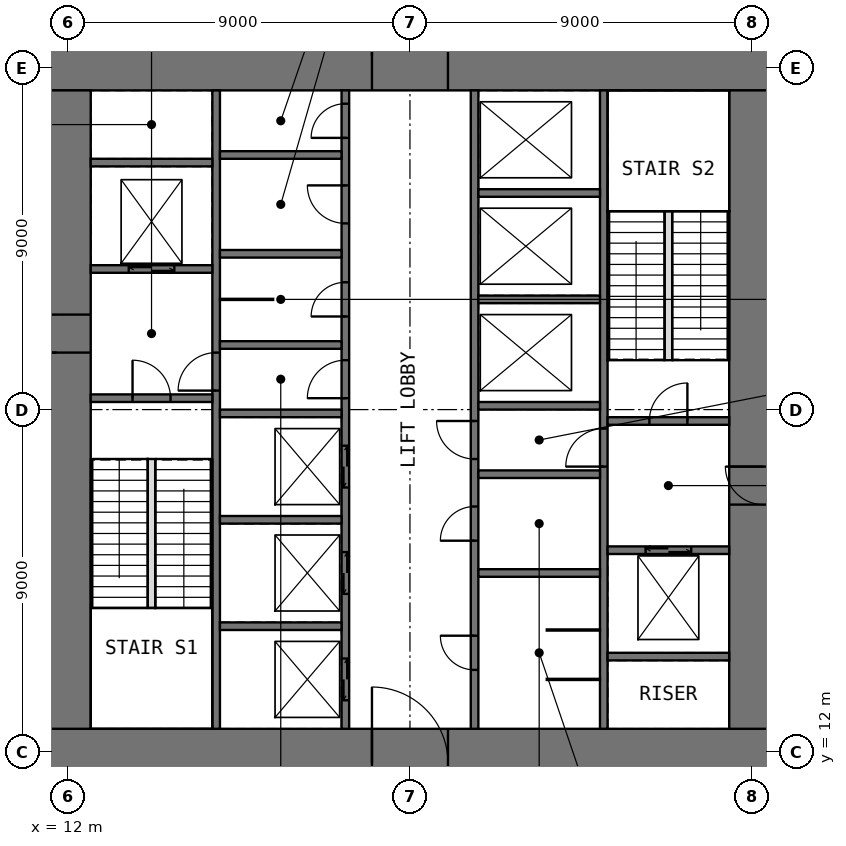
"""IFC4 building model, lengths in metres.
Left out: names, types, materials, properties, quantities, classifications, styles, units other than length and angle.
Written with IfcOpenShell. Run it as: python <this file> out.ifc"""

import sys

from ifc_helpers import new_model, si_unit, direction, frame, frame_2d, origin, place, context, subcontext, project, spatial, rectangle, extrude, element, fill, save


model = new_model("IFC4")
c1 = context("Model", 3, precision=1e-05, world=origin(), true_north=direction((0.0, 1.0)))
c2 = subcontext(c1, "Body", "Model", "MODEL_VIEW")
j1 = project(units=[si_unit("LENGTHUNIT", "METRE"), si_unit("PLANEANGLEUNIT", "RADIAN")], contexts=[c1])
p1 = place(None, origin())
s1 = spatial("IfcSite", under=j1, at=p1, CompositionType="ELEMENT")
p2 = place(p1, origin())
s2 = spatial("IfcBuilding", under=s1, at=p2, CompositionType="ELEMENT")
p3 = place(p2, frame((0.0, 0.0, 6.0)))
s3 = spatial("IfcBuildingStorey", under=s2, at=p3, CompositionType="ELEMENT", Elevation=6.0)
p4 = place(p3, frame((10.8, 11.7, -0.2), z_axis=(0.0, 0.0, 1.0), x_axis=(1.0, 0.0, 0.0)))
e1 = element("IfcWall", 1, at=p4, inside=s3, PredefinedType="SHEAR", context=c2, shape_type="SweptSolid", body=[
    extrude(rectangle(XDim=20.4, YDim=1.8, at=frame_2d((10.2, 0.0))), origin(), (0.0, 0.0, 1.0), 4.9),
])
p5 = place(p4, frame((9.2, 0.0, 0.2)))
e2 = element("IfcOpeningElement", 2, at=p5, cuts=e1, PredefinedType="OPENING", context=c2, shape_type="SweptSolid", body=[
    extrude(rectangle(XDim=2.0, YDim=2.2, at=frame_2d((1.0, 1.1))), frame((0.0, 0.91, 0.0), z_axis=(0.0, -1.0, 0.0), x_axis=(1.0, 0.0, 0.0)), (0.0, 0.0, 1.0), 1.82),
])
p6 = place(p3, frame((10.8, 30.3, -0.2), z_axis=(0.0, 0.0, 1.0), x_axis=(1.0, 0.0, 0.0)))
e3 = element("IfcWall", 3, at=p6, inside=s3, PredefinedType="SHEAR", context=c2, shape_type="SweptSolid", body=[
    extrude(rectangle(XDim=20.4, YDim=1.8, at=frame_2d((10.2, 0.0))), origin(), (0.0, 0.0, 1.0), 4.9),
])
p7 = place(p6, frame((9.2, 0.0, 0.2)))
e4 = element("IfcOpeningElement", 4, at=p7, cuts=e3, PredefinedType="OPENING", context=c2, shape_type="SweptSolid", body=[
    extrude(rectangle(XDim=2.0, YDim=2.2, at=frame_2d((1.0, 1.1))), frame((0.0, 0.91, 0.0), z_axis=(0.0, -1.0, 0.0), x_axis=(1.0, 0.0, 0.0)), (0.0, 0.0, 1.0), 1.82),
])
p8 = place(p3, frame((11.7, 12.6, -0.2), z_axis=(0.0, 0.0, 1.0), x_axis=(0.0, 1.0, 0.0)))
e5 = element("IfcWall", 5, at=p8, inside=s3, PredefinedType="SHEAR", context=c2, shape_type="SweptSolid", body=[
    extrude(rectangle(XDim=16.8, YDim=1.8, at=frame_2d((8.4, 0.0))), origin(), (0.0, 0.0, 1.0), 4.9),
])
p9 = place(p8, frame((9.9, 0.0, 0.2)))
e6 = element("IfcOpeningElement", 6, at=p9, cuts=e5, PredefinedType="OPENING", context=c2, shape_type="SweptSolid", body=[
    extrude(rectangle(XDim=1.0, YDim=2.2, at=frame_2d((0.5, 1.1))), frame((0.0, 0.91, 0.0), z_axis=(0.0, -1.0, 0.0), x_axis=(1.0, 0.0, 0.0)), (0.0, 0.0, 1.0), 1.82),
])
p10 = place(p3, frame((30.3, 12.6, -0.2), z_axis=(0.0, 0.0, 1.0), x_axis=(0.0, 1.0, 0.0)))
e7 = element("IfcWall", 7, at=p10, inside=s3, PredefinedType="SHEAR", context=c2, shape_type="SweptSolid", body=[
    extrude(rectangle(XDim=16.8, YDim=1.8, at=frame_2d((8.4, 0.0))), origin(), (0.0, 0.0, 1.0), 4.9),
])
p11 = place(p10, frame((5.9, 0.0, 0.2)))
e8 = element("IfcOpeningElement", 8, at=p11, cuts=e7, PredefinedType="OPENING", context=c2, shape_type="SweptSolid", body=[
    extrude(rectangle(XDim=1.0, YDim=2.2, at=frame_2d((0.5, 1.1))), frame((0.0, 0.91, 0.0), z_axis=(0.0, -1.0, 0.0), x_axis=(1.0, 0.0, 0.0)), (0.0, 0.0, 1.0), 1.82),
])
p12 = place(p3, frame((15.9, 12.6, -0.2), z_axis=(0.0, 0.0, 1.0), x_axis=(0.0, 1.0, 0.0)))
e9 = element("IfcWall", 9, at=p12, inside=s3, PredefinedType="SHEAR", context=c2, shape_type="SweptSolid", body=[
    extrude(rectangle(XDim=16.8, YDim=0.2, at=frame_2d((8.4, 0.0))), origin(), (0.0, 0.0, 1.0), 4.9),
])
p13 = place(p12, frame((8.9, 0.0, 0.2)))
e10 = element("IfcOpeningElement", 10, at=p13, cuts=e9, PredefinedType="OPENING", context=c2, shape_type="SweptSolid", body=[
    extrude(rectangle(XDim=1.0, YDim=2.2, at=frame_2d((0.5, 1.1))), frame((0.0, 0.11, 0.0), z_axis=(0.0, -1.0, 0.0), x_axis=(1.0, 0.0, 0.0)), (0.0, 0.0, 1.0), 0.22),
])
p14 = place(p3, frame((19.3, 12.6, -0.2), z_axis=(0.0, 0.0, 1.0), x_axis=(0.0, 1.0, 0.0)))
e11 = element("IfcWall", 11, at=p14, inside=s3, PredefinedType="SHEAR", context=c2, shape_type="SweptSolid", body=[
    extrude(rectangle(XDim=16.8, YDim=0.2, at=frame_2d((8.4, 0.0))), origin(), (0.0, 0.0, 1.0), 4.9),
])
p15 = place(p14, frame((8.7, 0.0, 0.2)))
e12 = element("IfcOpeningElement", 12, at=p15, cuts=e11, PredefinedType="OPENING", context=c2, shape_type="SweptSolid", body=[
    extrude(rectangle(XDim=1.0, YDim=2.2, at=frame_2d((0.5, 1.1))), frame((0.0, 0.11, 0.0), z_axis=(0.0, -1.0, 0.0), x_axis=(1.0, 0.0, 0.0)), (0.0, 0.0, 1.0), 0.22),
])
p16 = place(p14, frame((10.85, 0.0, 0.2)))
e13 = element("IfcOpeningElement", 13, at=p16, cuts=e11, PredefinedType="OPENING", context=c2, shape_type="SweptSolid", body=[
    extrude(rectangle(XDim=0.9, YDim=2.2, at=frame_2d((0.45, 1.1))), frame((0.0, 0.11, 0.0), z_axis=(0.0, -1.0, 0.0), x_axis=(1.0, 0.0, 0.0)), (0.0, 0.0, 1.0), 0.22),
])
p17 = place(p14, frame((13.3, 0.0, 0.2)))
e14 = element("IfcOpeningElement", 14, at=p17, cuts=e11, PredefinedType="OPENING", context=c2, shape_type="SweptSolid", body=[
    extrude(rectangle(XDim=1.0, YDim=2.2, at=frame_2d((0.5, 1.1))), frame((0.0, 0.11, 0.0), z_axis=(0.0, -1.0, 0.0), x_axis=(1.0, 0.0, 0.0)), (0.0, 0.0, 1.0), 0.22),
])
p18 = place(p14, frame((15.55, 0.0, 0.2)))
e15 = element("IfcOpeningElement", 15, at=p18, cuts=e11, PredefinedType="OPENING", context=c2, shape_type="SweptSolid", body=[
    extrude(rectangle(XDim=0.9, YDim=2.2, at=frame_2d((0.45, 1.1))), frame((0.0, 0.11, 0.0), z_axis=(0.0, -1.0, 0.0), x_axis=(1.0, 0.0, 0.0)), (0.0, 0.0, 1.0), 0.22),
])
p19 = place(p14, frame((0.75, 0.0, 0.2)))
e16 = element("IfcOpeningElement", 16, at=p19, cuts=e11, PredefinedType="OPENING", context=c2, shape_type="SweptSolid", body=[
    extrude(rectangle(XDim=1.1, YDim=2.2, at=frame_2d((0.55, 1.1))), frame((0.0, 0.11, 0.0), z_axis=(0.0, -1.0, 0.0), x_axis=(1.0, 0.0, 0.0)), (0.0, 0.0, 1.0), 0.22),
])
p20 = place(p14, frame((3.55, 0.0, 0.2)))
e17 = element("IfcOpeningElement", 17, at=p20, cuts=e11, PredefinedType="OPENING", context=c2, shape_type="SweptSolid", body=[
    extrude(rectangle(XDim=1.1, YDim=2.2, at=frame_2d((0.55, 1.1))), frame((0.0, 0.11, 0.0), z_axis=(0.0, -1.0, 0.0), x_axis=(1.0, 0.0, 0.0)), (0.0, 0.0, 1.0), 0.22),
])
p21 = place(p14, frame((6.35, 0.0, 0.2)))
e18 = element("IfcOpeningElement", 18, at=p21, cuts=e11, PredefinedType="OPENING", context=c2, shape_type="SweptSolid", body=[
    extrude(rectangle(XDim=1.1, YDim=2.2, at=frame_2d((0.55, 1.1))), frame((0.0, 0.11, 0.0), z_axis=(0.0, -1.0, 0.0), x_axis=(1.0, 0.0, 0.0)), (0.0, 0.0, 1.0), 0.22),
])
p22 = place(p3, frame((22.7, 12.6, -0.2), z_axis=(0.0, 0.0, 1.0), x_axis=(0.0, 1.0, 0.0)))
e19 = element("IfcWall", 19, at=p22, inside=s3, PredefinedType="SHEAR", context=c2, shape_type="SweptSolid", body=[
    extrude(rectangle(XDim=16.8, YDim=0.2, at=frame_2d((8.4, 0.0))), origin(), (0.0, 0.0, 1.0), 4.9),
])
p23 = place(p22, frame((7.1, 0.0, 0.2)))
e20 = element("IfcOpeningElement", 20, at=p23, cuts=e19, PredefinedType="OPENING", context=c2, shape_type="SweptSolid", body=[
    extrude(rectangle(XDim=1.0, YDim=2.2, at=frame_2d((0.5, 1.1))), frame((0.0, 0.11, 0.0), z_axis=(0.0, -1.0, 0.0), x_axis=(1.0, 0.0, 0.0)), (0.0, 0.0, 1.0), 0.22),
])
p24 = place(p22, frame((1.55, 0.0, 0.2)))
e21 = element("IfcOpeningElement", 21, at=p24, cuts=e19, PredefinedType="OPENING", context=c2, shape_type="SweptSolid", body=[
    extrude(rectangle(XDim=0.9, YDim=2.2, at=frame_2d((0.45, 1.1))), frame((0.0, 0.11, 0.0), z_axis=(0.0, -1.0, 0.0), x_axis=(1.0, 0.0, 0.0)), (0.0, 0.0, 1.0), 0.22),
])
p25 = place(p22, frame((4.95, 0.0, 0.2)))
e22 = element("IfcOpeningElement", 22, at=p25, cuts=e19, PredefinedType="OPENING", context=c2, shape_type="SweptSolid", body=[
    extrude(rectangle(XDim=0.9, YDim=2.2, at=frame_2d((0.45, 1.1))), frame((0.0, 0.11, 0.0), z_axis=(0.0, -1.0, 0.0), x_axis=(1.0, 0.0, 0.0)), (0.0, 0.0, 1.0), 0.22),
])
p26 = place(p3, frame((26.1, 12.6, -0.2), z_axis=(0.0, 0.0, 1.0), x_axis=(0.0, 1.0, 0.0)))
e23 = element("IfcWall", 23, at=p26, inside=s3, PredefinedType="SHEAR", context=c2, shape_type="SweptSolid", body=[
    extrude(rectangle(XDim=16.8, YDim=0.2, at=frame_2d((8.4, 0.0))), origin(), (0.0, 0.0, 1.0), 4.9),
])
p27 = place(p26, frame((6.9, 0.0, 0.2)))
e24 = element("IfcOpeningElement", 24, at=p27, cuts=e23, PredefinedType="OPENING", context=c2, shape_type="SweptSolid", body=[
    extrude(rectangle(XDim=1.0, YDim=2.2, at=frame_2d((0.5, 1.1))), frame((0.0, 0.11, 0.0), z_axis=(0.0, -1.0, 0.0), x_axis=(1.0, 0.0, 0.0)), (0.0, 0.0, 1.0), 0.22),
])
p28 = place(p3, frame((12.6, 21.3, -0.2), z_axis=(0.0, 0.0, 1.0), x_axis=(1.0, 0.0, 0.0)))
e25 = element("IfcWall", 25, at=p28, inside=s3, PredefinedType="SHEAR", context=c2, shape_type="SweptSolid", body=[
    extrude(rectangle(XDim=3.2, YDim=0.2, at=frame_2d((1.6, 0.0))), origin(), (0.0, 0.0, 1.0), 4.9),
])
p29 = place(p28, frame((1.1, 0.0, 0.2)))
e26 = element("IfcOpeningElement", 26, at=p29, cuts=e25, PredefinedType="OPENING", context=c2, shape_type="SweptSolid", body=[
    extrude(rectangle(XDim=1.0, YDim=2.2, at=frame_2d((0.5, 1.1))), frame((0.0, 0.11, 0.0), z_axis=(0.0, -1.0, 0.0), x_axis=(1.0, 0.0, 0.0)), (0.0, 0.0, 1.0), 0.22),
])
p30 = place(p3, frame((12.6, 24.7, -0.2), z_axis=(0.0, 0.0, 1.0), x_axis=(1.0, 0.0, 0.0)))
e27 = element("IfcWall", 27, at=p30, inside=s3, PredefinedType="SHEAR", context=c2, shape_type="SweptSolid", body=[
    extrude(rectangle(XDim=3.2, YDim=0.2, at=frame_2d((1.6, 0.0))), origin(), (0.0, 0.0, 1.0), 4.9),
])
p31 = place(p30, frame((1.0, 0.0, 0.2)))
e28 = element("IfcOpeningElement", 28, at=p31, cuts=e27, PredefinedType="OPENING", context=c2, shape_type="SweptSolid", body=[
    extrude(rectangle(XDim=1.2, YDim=2.2, at=frame_2d((0.6, 1.1))), frame((0.0, 0.11, 0.0), z_axis=(0.0, -1.0, 0.0), x_axis=(1.0, 0.0, 0.0)), (0.0, 0.0, 1.0), 0.22),
])
for number, where, z_axis, x_axis in (
    (29, (12.6, 27.5, -0.2), (0.0, 0.0, 1.0), (1.0, 0.0, 0.0)),
    (30, (16.0, 15.3, -0.2), (0.0, 0.0, 1.0), (1.0, 0.0, 0.0)),
    (31, (16.0, 18.1, -0.2), (0.0, 0.0, 1.0), (1.0, 0.0, 0.0)),
    (32, (16.0, 20.9, -0.2), (0.0, 0.0, 1.0), (1.0, 0.0, 0.0)),
    (33, (16.0, 22.7, -0.2), (0.0, 0.0, 1.0), (1.0, 0.0, 0.0)),
    (34, (16.0, 25.1, -0.2), (0.0, 0.0, 1.0), (1.0, 0.0, 0.0)),
    (35, (16.0, 27.7, -0.2), (0.0, 0.0, 1.0), (1.0, 0.0, 0.0)),
    (36, (22.8, 16.7, -0.2), (0.0, 0.0, 1.0), (1.0, 0.0, 0.0)),
    (37, (22.8, 19.3, -0.2), (0.0, 0.0, 1.0), (1.0, 0.0, 0.0)),
    (38, (22.8, 21.1, -0.2), (0.0, 0.0, 1.0), (1.0, 0.0, 0.0)),
    (39, (22.8, 23.9, -0.2), (0.0, 0.0, 1.0), (1.0, 0.0, 0.0)),
    (40, (22.8, 26.7, -0.2), (0.0, 0.0, 1.0), (1.0, 0.0, 0.0)),
    (41, (26.2, 14.5, -0.2), (0.0, 0.0, 1.0), (1.0, 0.0, 0.0)),
):
    element("IfcWall", number, at=place(p3, frame(where, z_axis=z_axis, x_axis=x_axis)), inside=s3, PredefinedType="SHEAR", context=c2, shape_type="SweptSolid", body=[
        extrude(rectangle(XDim=3.2, YDim=0.2, at=frame_2d((1.6, 0.0))), origin(), (0.0, 0.0, 1.0), 4.9),
    ])
p32 = place(p3, frame((26.2, 17.3, -0.2), z_axis=(0.0, 0.0, 1.0), x_axis=(1.0, 0.0, 0.0)))
e42 = element("IfcWall", 42, at=p32, inside=s3, PredefinedType="SHEAR", context=c2, shape_type="SweptSolid", body=[
    extrude(rectangle(XDim=3.2, YDim=0.2, at=frame_2d((1.6, 0.0))), origin(), (0.0, 0.0, 1.0), 4.9),
])
p33 = place(p32, frame((1.0, 0.0, 0.2)))
e43 = element("IfcOpeningElement", 43, at=p33, cuts=e42, PredefinedType="OPENING", context=c2, shape_type="SweptSolid", body=[
    extrude(rectangle(XDim=1.2, YDim=2.2, at=frame_2d((0.6, 1.1))), frame((0.0, 0.11, 0.0), z_axis=(0.0, -1.0, 0.0), x_axis=(1.0, 0.0, 0.0)), (0.0, 0.0, 1.0), 0.22),
])
p34 = place(p3, frame((26.2, 20.7, -0.2), z_axis=(0.0, 0.0, 1.0), x_axis=(1.0, 0.0, 0.0)))
e44 = element("IfcWall", 44, at=p34, inside=s3, PredefinedType="SHEAR", context=c2, shape_type="SweptSolid", body=[
    extrude(rectangle(XDim=3.2, YDim=0.2, at=frame_2d((1.6, 0.0))), origin(), (0.0, 0.0, 1.0), 4.9),
])
p35 = place(p34, frame((1.1, 0.0, 0.2)))
e45 = element("IfcOpeningElement", 45, at=p35, cuts=e44, PredefinedType="OPENING", context=c2, shape_type="SweptSolid", body=[
    extrude(rectangle(XDim=1.0, YDim=2.2, at=frame_2d((0.5, 1.1))), frame((0.0, 0.11, 0.0), z_axis=(0.0, -1.0, 0.0), x_axis=(1.0, 0.0, 0.0)), (0.0, 0.0, 1.0), 0.22),
])
for number, where, z_axis, x_axis in (
    (46, (24.6, 13.9, 0.0), (0.0, 0.0, 1.0), (1.0, 0.0, 0.0)),
    (47, (24.6, 15.2, 0.0), (0.0, 0.0, 1.0), (1.0, 0.0, 0.0)),
    (48, (16.0, 23.9, 0.0), (0.0, 0.0, 1.0), (1.0, 0.0, 0.0)),
):
    element("IfcWall", number, at=place(p3, frame(where, z_axis=z_axis, x_axis=x_axis)), inside=s3, PredefinedType="PARTITIONING", context=c2, shape_type="SweptSolid", body=[
        extrude(rectangle(XDim=1.4, YDim=0.03, at=frame_2d((0.7, 0.0))), origin(), (0.0, 0.0, 1.0), 4.5),
    ])
for number, where, z_axis, x_axis in (
    (49, (14.2, 15.78, 0.0), (0.0, 0.0, 1.0), (0.0, 1.0, 0.0)),
    (50, (27.8, 22.3, 0.0), (0.0, 0.0, 1.0), (0.0, 1.0, 0.0)),
):
    element("IfcWall", number, at=place(p3, frame(where, z_axis=z_axis, x_axis=x_axis)), inside=s3, PredefinedType="PARTITIONING", context=c2, shape_type="SweptSolid", body=[
        extrude(rectangle(XDim=3.92, YDim=0.2, at=frame_2d((1.96, 0.0))), origin(), (0.0, 0.0, 1.0), 5.0),
    ])
p36 = place(p5, origin())
e51 = element("IfcDoor", 51, at=p36, inside=s3, OperationType="DOUBLE_DOOR_SINGLE_SWING", PredefinedType="DOOR", context=c2, shape_type="SweptSolid", body=[
    extrude(rectangle(XDim=2.0, YDim=2.2, at=frame_2d((1.0, 1.1))), frame((0.0, 0.025, 0.0), z_axis=(0.0, -1.0, 0.0), x_axis=(1.0, 0.0, 0.0)), (0.0, 0.0, 1.0), 0.05),
])
fill(e2, e51)
p37 = place(p7, origin())
e52 = element("IfcDoor", 52, at=p37, inside=s3, OperationType="DOUBLE_DOOR_SINGLE_SWING", PredefinedType="DOOR", context=c2, shape_type="SweptSolid", body=[
    extrude(rectangle(XDim=2.0, YDim=2.2, at=frame_2d((1.0, 1.1))), frame((0.0, 0.025, 0.0), z_axis=(0.0, -1.0, 0.0), x_axis=(1.0, 0.0, 0.0)), (0.0, 0.0, 1.0), 0.05),
])
fill(e4, e52)
p38 = place(p9, origin())
e53 = element("IfcDoor", 53, at=p38, inside=s3, OperationType="SINGLE_SWING_LEFT", PredefinedType="DOOR", context=c2, shape_type="SweptSolid", body=[
    extrude(rectangle(XDim=1.0, YDim=2.2, at=frame_2d((0.5, 1.1))), frame((0.0, 0.025, 0.0), z_axis=(0.0, -1.0, 0.0), x_axis=(1.0, 0.0, 0.0)), (0.0, 0.0, 1.0), 0.05),
])
fill(e6, e53)
p39 = place(p11, origin())
e54 = element("IfcDoor", 54, at=p39, inside=s3, OperationType="SINGLE_SWING_RIGHT", PredefinedType="DOOR", context=c2, shape_type="SweptSolid", body=[
    extrude(rectangle(XDim=1.0, YDim=2.2, at=frame_2d((0.5, 1.1))), frame((0.0, 0.025, 0.0), z_axis=(0.0, -1.0, 0.0), x_axis=(1.0, 0.0, 0.0)), (0.0, 0.0, 1.0), 0.05),
])
fill(e8, e54)
p40 = place(p29, origin())
e55 = element("IfcDoor", 55, at=p40, inside=s3, OperationType="SINGLE_SWING_LEFT", PredefinedType="DOOR", context=c2, shape_type="SweptSolid", body=[
    extrude(rectangle(XDim=1.0, YDim=2.2, at=frame_2d((0.5, 1.1))), frame((0.0, 0.025, 0.0), z_axis=(0.0, -1.0, 0.0), x_axis=(1.0, 0.0, 0.0)), (0.0, 0.0, 1.0), 0.05),
])
fill(e26, e55)
p41 = place(p35, origin())
e56 = element("IfcDoor", 56, at=p41, inside=s3, OperationType="SINGLE_SWING_RIGHT", PredefinedType="DOOR", context=c2, shape_type="SweptSolid", body=[
    extrude(rectangle(XDim=1.0, YDim=2.2, at=frame_2d((0.5, 1.1))), frame((0.0, 0.025, 0.0), z_axis=(0.0, -1.0, 0.0), x_axis=(1.0, 0.0, 0.0)), (0.0, 0.0, 1.0), 0.05),
])
fill(e45, e56)
p42 = place(p13, origin())
e57 = element("IfcDoor", 57, at=p42, inside=s3, OperationType="SINGLE_SWING_LEFT", PredefinedType="DOOR", context=c2, shape_type="SweptSolid", body=[
    extrude(rectangle(XDim=1.0, YDim=2.2, at=frame_2d((0.5, 1.1))), frame((0.0, 0.025, 0.0), z_axis=(0.0, -1.0, 0.0), x_axis=(1.0, 0.0, 0.0)), (0.0, 0.0, 1.0), 0.05),
])
fill(e10, e57)
p43 = place(p27, origin())
e58 = element("IfcDoor", 58, at=p43, inside=s3, OperationType="SINGLE_SWING_LEFT", PredefinedType="DOOR", context=c2, shape_type="SweptSolid", body=[
    extrude(rectangle(XDim=1.0, YDim=2.2, at=frame_2d((0.5, 1.1))), frame((0.0, 0.025, 0.0), z_axis=(0.0, -1.0, 0.0), x_axis=(1.0, 0.0, 0.0)), (0.0, 0.0, 1.0), 0.05),
])
fill(e24, e58)
p44 = place(p15, origin())
e59 = element("IfcDoor", 59, at=p44, inside=s3, OperationType="SINGLE_SWING_LEFT", PredefinedType="DOOR", context=c2, shape_type="SweptSolid", body=[
    extrude(rectangle(XDim=1.0, YDim=2.2, at=frame_2d((0.5, 1.1))), frame((0.0, 0.025, 0.0), z_axis=(0.0, -1.0, 0.0), x_axis=(1.0, 0.0, 0.0)), (0.0, 0.0, 1.0), 0.05),
])
fill(e12, e59)
p45 = place(p23, origin())
e60 = element("IfcDoor", 60, at=p45, inside=s3, OperationType="SINGLE_SWING_RIGHT", PredefinedType="DOOR", context=c2, shape_type="SweptSolid", body=[
    extrude(rectangle(XDim=1.0, YDim=2.2, at=frame_2d((0.5, 1.1))), frame((0.0, 0.025, 0.0), z_axis=(0.0, -1.0, 0.0), x_axis=(1.0, 0.0, 0.0)), (0.0, 0.0, 1.0), 0.05),
])
fill(e20, e60)
p46 = place(p16, origin())
e61 = element("IfcDoor", 61, at=p46, inside=s3, OperationType="SINGLE_SWING_LEFT", PredefinedType="DOOR", context=c2, shape_type="SweptSolid", body=[
    extrude(rectangle(XDim=0.9, YDim=2.2, at=frame_2d((0.45, 1.1))), frame((0.0, 0.025, 0.0), z_axis=(0.0, -1.0, 0.0), x_axis=(1.0, 0.0, 0.0)), (0.0, 0.0, 1.0), 0.05),
])
fill(e13, e61)
p47 = place(p17, origin())
e62 = element("IfcDoor", 62, at=p47, inside=s3, OperationType="SINGLE_SWING_RIGHT", PredefinedType="DOOR", context=c2, shape_type="SweptSolid", body=[
    extrude(rectangle(XDim=1.0, YDim=2.2, at=frame_2d((0.5, 1.1))), frame((0.0, 0.025, 0.0), z_axis=(0.0, -1.0, 0.0), x_axis=(1.0, 0.0, 0.0)), (0.0, 0.0, 1.0), 0.05),
])
fill(e14, e62)
p48 = place(p18, origin())
e63 = element("IfcDoor", 63, at=p48, inside=s3, OperationType="SINGLE_SWING_LEFT", PredefinedType="DOOR", context=c2, shape_type="SweptSolid", body=[
    extrude(rectangle(XDim=0.9, YDim=2.2, at=frame_2d((0.45, 1.1))), frame((0.0, 0.025, 0.0), z_axis=(0.0, -1.0, 0.0), x_axis=(1.0, 0.0, 0.0)), (0.0, 0.0, 1.0), 0.05),
])
fill(e15, e63)
p49 = place(p24, origin())
e64 = element("IfcDoor", 64, at=p49, inside=s3, OperationType="SINGLE_SWING_RIGHT", PredefinedType="DOOR", context=c2, shape_type="SweptSolid", body=[
    extrude(rectangle(XDim=0.9, YDim=2.2, at=frame_2d((0.45, 1.1))), frame((0.0, 0.025, 0.0), z_axis=(0.0, -1.0, 0.0), x_axis=(1.0, 0.0, 0.0)), (0.0, 0.0, 1.0), 0.05),
])
fill(e21, e64)
p50 = place(p25, origin())
e65 = element("IfcDoor", 65, at=p50, inside=s3, OperationType="SINGLE_SWING_LEFT", PredefinedType="DOOR", context=c2, shape_type="SweptSolid", body=[
    extrude(rectangle(XDim=0.9, YDim=2.2, at=frame_2d((0.45, 1.1))), frame((0.0, 0.025, 0.0), z_axis=(0.0, -1.0, 0.0), x_axis=(1.0, 0.0, 0.0)), (0.0, 0.0, 1.0), 0.05),
])
fill(e22, e65)
p51 = place(p19, origin())
e66 = element("IfcDoor", 66, at=p51, inside=s3, OperationType="DOUBLE_DOOR_SLIDING", PredefinedType="DOOR", context=c2, shape_type="SweptSolid", body=[
    extrude(rectangle(XDim=1.1, YDim=2.2, at=frame_2d((0.55, 1.1))), frame((0.0, 0.025, 0.0), z_axis=(0.0, -1.0, 0.0), x_axis=(1.0, 0.0, 0.0)), (0.0, 0.0, 1.0), 0.05),
])
fill(e16, e66)
p52 = place(p20, origin())
e67 = element("IfcDoor", 67, at=p52, inside=s3, OperationType="DOUBLE_DOOR_SLIDING", PredefinedType="DOOR", context=c2, shape_type="SweptSolid", body=[
    extrude(rectangle(XDim=1.1, YDim=2.2, at=frame_2d((0.55, 1.1))), frame((0.0, 0.025, 0.0), z_axis=(0.0, -1.0, 0.0), x_axis=(1.0, 0.0, 0.0)), (0.0, 0.0, 1.0), 0.05),
])
fill(e17, e67)
p53 = place(p21, origin())
e68 = element("IfcDoor", 68, at=p53, inside=s3, OperationType="DOUBLE_DOOR_SLIDING", PredefinedType="DOOR", context=c2, shape_type="SweptSolid", body=[
    extrude(rectangle(XDim=1.1, YDim=2.2, at=frame_2d((0.55, 1.1))), frame((0.0, 0.025, 0.0), z_axis=(0.0, -1.0, 0.0), x_axis=(1.0, 0.0, 0.0)), (0.0, 0.0, 1.0), 0.05),
])
fill(e18, e68)
p54 = place(p31, origin())
e69 = element("IfcDoor", 69, at=p54, inside=s3, OperationType="DOUBLE_DOOR_SLIDING", PredefinedType="DOOR", context=c2, shape_type="SweptSolid", body=[
    extrude(rectangle(XDim=1.2, YDim=2.2, at=frame_2d((0.6, 1.1))), frame((0.0, 0.025, 0.0), z_axis=(0.0, -1.0, 0.0), x_axis=(1.0, 0.0, 0.0)), (0.0, 0.0, 1.0), 0.05),
])
fill(e28, e69)
p55 = place(p33, origin())
e70 = element("IfcDoor", 70, at=p55, inside=s3, OperationType="DOUBLE_DOOR_SLIDING", PredefinedType="DOOR", context=c2, shape_type="SweptSolid", body=[
    extrude(rectangle(XDim=1.2, YDim=2.2, at=frame_2d((0.6, 1.1))), frame((0.0, 0.025, 0.0), z_axis=(0.0, -1.0, 0.0), x_axis=(1.0, 0.0, 0.0)), (0.0, 0.0, 1.0), 0.05),
])
fill(e43, e70)
save(model, sys.argv[1])
